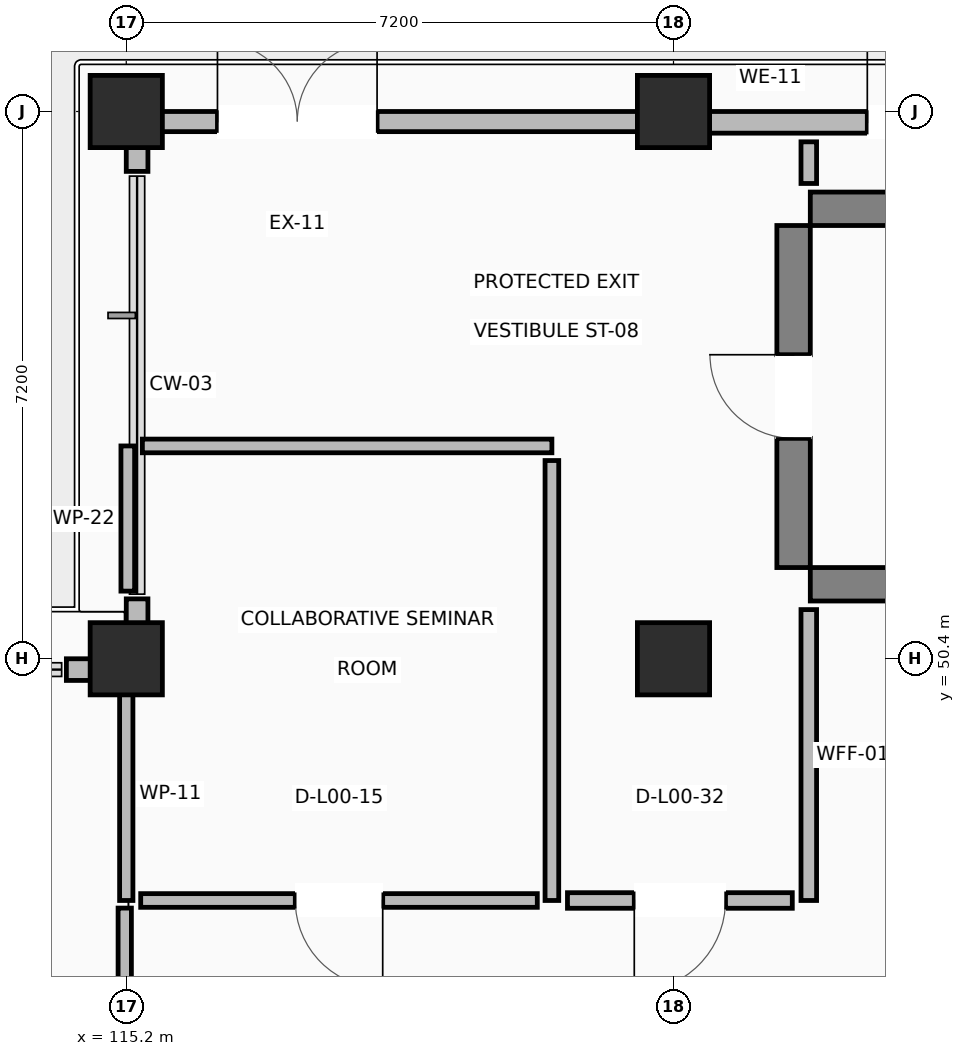
"""IFC4 building model, lengths in metres.
Left out: names, types, materials, properties, quantities, classifications, styles, units other than length and angle.
Written with IfcOpenShell. Run it as: python <this file> out.ifc"""

import sys

from ifc_helpers import new_model, si_unit, direction, frame, frame_2d, origin, origin_2d, place, context, subcontext, project, spatial, rectangle, extrude, element, fill, save


model = new_model("IFC4")
c1 = context("Model", 3, precision=1e-05, world=origin(), true_north=direction((0.0, 1.0)))
c2 = subcontext(c1, "Body", "Model", "MODEL_VIEW")
j1 = project(units=[si_unit("LENGTHUNIT", "METRE"), si_unit("PLANEANGLEUNIT", "RADIAN")], contexts=[c1])
p1 = place(None, origin())
s1 = spatial("IfcSite", under=j1, at=p1, CompositionType="ELEMENT")
p2 = place(p1, origin())
s2 = spatial("IfcBuilding", under=s1, at=p2, CompositionType="ELEMENT")
p3 = place(p2, origin())
s3 = spatial("IfcBuildingStorey", under=s2, at=p3, CompositionType="ELEMENT", Elevation=0.0)
for number, where, z_axis, x_axis in (
    (1, (115.2, 50.4, 0.0), (0.0, 0.0, 1.0), (1.0, 0.0, 0.0)),
    (2, (115.2, 57.6, 0.0), (0.0, 0.0, 1.0), (1.0, 0.0, 0.0)),
    (3, (122.4, 50.4, 0.0), (0.0, 0.0, 1.0), (1.0, 0.0, 0.0)),
    (4, (122.4, 57.6, 0.0), (0.0, 0.0, 1.0), (1.0, 0.0, 0.0)),
):
    element("IfcColumn", number, at=place(p3, frame(where, z_axis=z_axis, x_axis=x_axis)), inside=s3, PredefinedType="COLUMN", context=c2, shape_type="SweptSolid", body=[
        extrude(rectangle(XDim=0.95, YDim=0.95, at=origin_2d()), origin(), (0.0, 0.0, 1.0), 4.22),
    ])
for number, where, z_axis, x_axis in (
    (5, (124.2, 51.38, 0.0), (0.0, 0.0, 1.0), (1.0, 0.0, 0.0)),
    (6, (124.2, 56.32, 0.0), (0.0, 0.0, 1.0), (1.0, 0.0, 0.0)),
):
    element("IfcWall", number, at=place(p3, frame(where, z_axis=z_axis, x_axis=x_axis)), inside=s3, PredefinedType="SHEAR", context=c2, shape_type="SweptSolid", body=[
        extrude(rectangle(XDim=9.5, YDim=0.44, at=frame_2d((4.75, 0.0))), origin(), (0.0, 0.0, 1.0), 4.22),
    ])
p4 = place(p3, frame((123.98, 51.6, 0.0), z_axis=(0.0, 0.0, 1.0), x_axis=(0.0, 1.0, 0.0)))
e7 = element("IfcWall", 7, at=p4, inside=s3, PredefinedType="SHEAR", context=c2, shape_type="SweptSolid", body=[
    extrude(rectangle(XDim=4.5, YDim=0.44, at=frame_2d((2.25, 0.0))), origin(), (0.0, 0.0, 1.0), 4.22),
])
p5 = place(p4, frame((1.7, 0.0, 0.0)))
e8 = element("IfcOpeningElement", 8, at=p5, cuts=e7, PredefinedType="OPENING", context=c2, shape_type="SweptSolid", body=[
    extrude(rectangle(XDim=1.1, YDim=2.15, at=frame_2d((0.55, 1.075))), frame((0.0, 0.23, 0.0), z_axis=(0.0, -1.0, 0.0), x_axis=(1.0, 0.0, 0.0)), (0.0, 0.0, 1.0), 0.46),
])
p6 = place(p3, frame((122.4, 57.458, 0.0), z_axis=(0.0, 0.0, 1.0), x_axis=(1.0, 0.0, 0.0)))
e9 = element("IfcWall", 9, at=p6, inside=s3, PredefinedType="STANDARD", context=c2, shape_type="SweptSolid", body=[
    extrude(rectangle(XDim=7.2, YDim=0.285, at=frame_2d((3.6, 0.0))), origin(), (0.0, 0.0, 1.0), 2.6),
])
p7 = place(p6, frame((2.55, 0.0, 0.0)))
e10 = element("IfcOpeningElement", 10, at=p7, cuts=e9, PredefinedType="OPENING", context=c2, shape_type="SweptSolid", body=[
    extrude(rectangle(XDim=2.1, YDim=2.3, at=frame_2d((1.05, 1.15))), frame((0.0, 0.152, 0.0), z_axis=(0.0, -1.0, 0.0), x_axis=(1.0, 0.0, 0.0)), (0.0, 0.0, 1.0), 0.305),
])
p8 = place(p3, frame((115.2, 57.468, 0.0), z_axis=(0.0, 0.0, 1.0), x_axis=(1.0, 0.0, 0.0)))
e11 = element("IfcWall", 11, at=p8, inside=s3, PredefinedType="STANDARD", context=c2, shape_type="SweptSolid", body=[
    extrude(rectangle(XDim=7.2, YDim=0.265, at=frame_2d((3.6, 0.0))), origin(), (0.0, 0.0, 1.0), 2.6),
])
p9 = place(p8, frame((1.2, 0.0, 0.0)))
e12 = element("IfcOpeningElement", 12, at=p9, cuts=e11, PredefinedType="OPENING", context=c2, shape_type="SweptSolid", body=[
    extrude(rectangle(XDim=2.1, YDim=2.3, at=frame_2d((1.05, 1.15))), frame((0.0, 0.142, 0.0), z_axis=(0.0, -1.0, 0.0), x_axis=(1.0, 0.0, 0.0)), (0.0, 0.0, 1.0), 0.285),
])
p10 = place(p3, frame((115.343, 57.335, 0.0), z_axis=(0.0, 0.0, 1.0), x_axis=(0.0, -1.0, 0.0)))
e13 = element("IfcWall", 13, at=p10, inside=s3, PredefinedType="STANDARD", context=c2, shape_type="SweptSolid", body=[
    extrude(rectangle(XDim=0.523, YDim=0.285, at=frame_2d((0.261, 0.0))), origin(), (0.0, 0.0, 1.0), 2.6),
])
p11 = place(p3, frame((115.343, 51.188, 0.0), z_axis=(0.0, 0.0, 1.0), x_axis=(0.0, -1.0, 0.0)))
e14 = element("IfcWall", 14, at=p11, inside=s3, PredefinedType="STANDARD", context=c2, shape_type="SweptSolid", body=[
    extrude(rectangle(XDim=0.788, YDim=0.285, at=frame_2d((0.394, 0.0))), origin(), (0.0, 0.0, 1.0), 2.6),
])
p12 = place(p3, frame((115.485, 50.258, 0.0), z_axis=(0.0, 0.0, 1.0), x_axis=(-1.0, 0.0, 0.0)))
e15 = element("IfcWall", 15, at=p12, inside=s3, PredefinedType="STANDARD", context=c2, shape_type="SweptSolid", body=[
    extrude(rectangle(XDim=1.073, YDim=0.285, at=frame_2d((0.537, 0.0))), origin(), (0.0, 0.0, 1.0), 2.6),
])
p13 = place(p3, frame((115.2, 50.016, 0.0), z_axis=(0.0, 0.0, 1.0), x_axis=(0.0, -1.0, 0.0)))
e16 = element("IfcWall", 16, at=p13, inside=s3, PredefinedType="PARTITIONING", context=c2, shape_type="SweptSolid", body=[
    extrude(rectangle(XDim=2.796, YDim=0.175, at=frame_2d((1.398, 0.0))), origin(), (0.0, 0.0, 1.0), 2.6),
])
p14 = place(p3, frame((115.18, 47.12, 0.0), z_axis=(0.0, 0.0, 1.0), x_axis=(0.0, -1.0, 0.0)))
e17 = element("IfcWall", 17, at=p14, inside=s3, PredefinedType="PARTITIONING", context=c2, shape_type="SweptSolid", body=[
    extrude(rectangle(XDim=2.92, YDim=0.175, at=frame_2d((1.46, 0.0))), origin(), (0.0, 0.0, 1.0), 2.6),
])
p15 = place(p3, frame((115.22, 51.29, 0.0), z_axis=(0.0, 0.0, 1.0), x_axis=(0.0, 1.0, 0.0)))
e18 = element("IfcWall", 18, at=p15, inside=s3, PredefinedType="PARTITIONING", context=c2, shape_type="SweptSolid", body=[
    extrude(rectangle(XDim=1.91, YDim=0.18, at=frame_2d((0.955, 0.0))), origin(), (0.0, 0.0, 1.0), 2.6),
])
p16 = place(p3, frame((115.412, 53.2, 0.0), z_axis=(0.0, 0.0, 1.0), x_axis=(1.0, 0.0, 0.0)))
e19 = element("IfcWall", 19, at=p16, inside=s3, PredefinedType="PARTITIONING", context=c2, shape_type="SweptSolid", body=[
    extrude(rectangle(XDim=5.388, YDim=0.18, at=frame_2d((2.694, 0.0))), origin(), (0.0, 0.0, 1.0), 2.6),
])
p17 = place(p3, frame((120.8, 53.008, 0.0), z_axis=(0.0, 0.0, 1.0), x_axis=(0.0, -1.0, 0.0)))
e20 = element("IfcWall", 20, at=p17, inside=s3, PredefinedType="PARTITIONING", context=c2, shape_type="SweptSolid", body=[
    extrude(rectangle(XDim=5.788, YDim=0.18, at=frame_2d((2.894, 0.0))), origin(), (0.0, 0.0, 1.0), 2.6),
])
p18 = place(p3, frame((120.608, 47.22, 0.0), z_axis=(0.0, 0.0, 1.0), x_axis=(-1.0, 0.0, 0.0)))
e21 = element("IfcWall", 21, at=p18, inside=s3, PredefinedType="PARTITIONING", context=c2, shape_type="SweptSolid", body=[
    extrude(rectangle(XDim=5.218, YDim=0.18, at=frame_2d((2.609, 0.0))), origin(), (0.0, 0.0, 1.0), 2.6),
])
p19 = place(p18, frame((2.034, 0.0, 0.0)))
e22 = element("IfcOpeningElement", 22, at=p19, cuts=e21, PredefinedType="OPENING", context=c2, shape_type="SweptSolid", body=[
    extrude(rectangle(XDim=1.15, YDim=2.15, at=frame_2d((0.575, 1.075))), frame((0.0, 0.1, 0.0), z_axis=(0.0, -1.0, 0.0), x_axis=(1.0, 0.0, 0.0)), (0.0, 0.0, 1.0), 0.2),
])
p20 = place(p3, frame((124.18, 57.201, 0.0), z_axis=(0.0, 0.0, 1.0), x_axis=(0.0, -1.0, 0.0)))
e23 = element("IfcWall", 23, at=p20, inside=s3, PredefinedType="PARTITIONING", context=c2, shape_type="SweptSolid", body=[
    extrude(rectangle(XDim=0.548, YDim=0.205, at=frame_2d((0.274, 0.0))), origin(), (0.0, 0.0, 1.0), 2.6),
])
p21 = place(p3, frame((124.18, 51.047, 0.0), z_axis=(0.0, 0.0, 1.0), x_axis=(0.0, -1.0, 0.0)))
e24 = element("IfcWall", 24, at=p21, inside=s3, PredefinedType="PARTITIONING", context=c2, shape_type="SweptSolid", body=[
    extrude(rectangle(XDim=3.827, YDim=0.205, at=frame_2d((1.914, 0.0))), origin(), (0.0, 0.0, 1.0), 2.6),
])
p22 = place(p3, frame((123.963, 47.22, 0.0), z_axis=(0.0, 0.0, 1.0), x_axis=(-1.0, 0.0, 0.0)))
e25 = element("IfcWall", 25, at=p22, inside=s3, PredefinedType="PARTITIONING", context=c2, shape_type="SweptSolid", body=[
    extrude(rectangle(XDim=2.958, YDim=0.205, at=frame_2d((1.479, 0.0))), origin(), (0.0, 0.0, 1.0), 2.6),
])
p23 = place(p22, frame((0.879, 0.0, 0.0)))
e26 = element("IfcOpeningElement", 26, at=p23, cuts=e25, PredefinedType="OPENING", context=c2, shape_type="SweptSolid", body=[
    extrude(rectangle(XDim=1.2, YDim=2.15, at=frame_2d((0.6, 1.075))), frame((0.0, 0.113, 0.0), z_axis=(0.0, -1.0, 0.0), x_axis=(1.0, 0.0, 0.0)), (0.0, 0.0, 1.0), 0.225),
])
p24 = place(p7, origin())
e27 = element("IfcDoor", 27, at=p24, inside=s3, OperationType="DOUBLE_DOOR_SINGLE_SWING", PredefinedType="DOOR", context=c2, shape_type="SweptSolid", body=[
    extrude(rectangle(XDim=2.1, YDim=2.3, at=frame_2d((1.05, 1.15))), frame((0.0, 0.025, 0.0), z_axis=(0.0, -1.0, 0.0), x_axis=(1.0, 0.0, 0.0)), (0.0, 0.0, 1.0), 0.05),
])
fill(e10, e27)
p25 = place(p9, origin())
e28 = element("IfcDoor", 28, at=p25, inside=s3, OperationType="DOUBLE_DOOR_SINGLE_SWING", PredefinedType="DOOR", context=c2, shape_type="SweptSolid", body=[
    extrude(rectangle(XDim=2.1, YDim=2.3, at=frame_2d((1.05, 1.15))), frame((0.0, 0.025, 0.0), z_axis=(0.0, -1.0, 0.0), x_axis=(1.0, 0.0, 0.0)), (0.0, 0.0, 1.0), 0.05),
])
fill(e12, e28)
p26 = place(p5, origin())
e29 = element("IfcDoor", 29, at=p26, inside=s3, OperationType="SINGLE_SWING_RIGHT", PredefinedType="DOOR", context=c2, shape_type="SweptSolid", body=[
    extrude(rectangle(XDim=1.1, YDim=2.15, at=frame_2d((0.55, 1.075))), frame((0.0, 0.025, 0.0), z_axis=(0.0, -1.0, 0.0), x_axis=(1.0, 0.0, 0.0)), (0.0, 0.0, 1.0), 0.05),
])
fill(e8, e29)
p27 = place(p19, origin())
e30 = element("IfcDoor", 30, at=p27, inside=s3, OperationType="SINGLE_SWING_LEFT", PredefinedType="DOOR", context=c2, shape_type="SweptSolid", body=[
    extrude(rectangle(XDim=1.15, YDim=2.15, at=frame_2d((0.575, 1.075))), frame((0.0, 0.025, 0.0), z_axis=(0.0, -1.0, 0.0), x_axis=(1.0, 0.0, 0.0)), (0.0, 0.0, 1.0), 0.05),
])
fill(e22, e30)
p28 = place(p23, origin())
e31 = element("IfcDoor", 31, at=p28, inside=s3, OperationType="SINGLE_SWING_RIGHT", PredefinedType="DOOR", context=c2, shape_type="SweptSolid", body=[
    extrude(rectangle(XDim=1.2, YDim=2.15, at=frame_2d((0.6, 1.075))), frame((0.0, 0.025, 0.0), z_axis=(0.0, -1.0, 0.0), x_axis=(1.0, 0.0, 0.0)), (0.0, 0.0, 1.0), 0.05),
])
fill(e26, e31)
save(model, sys.argv[1])
